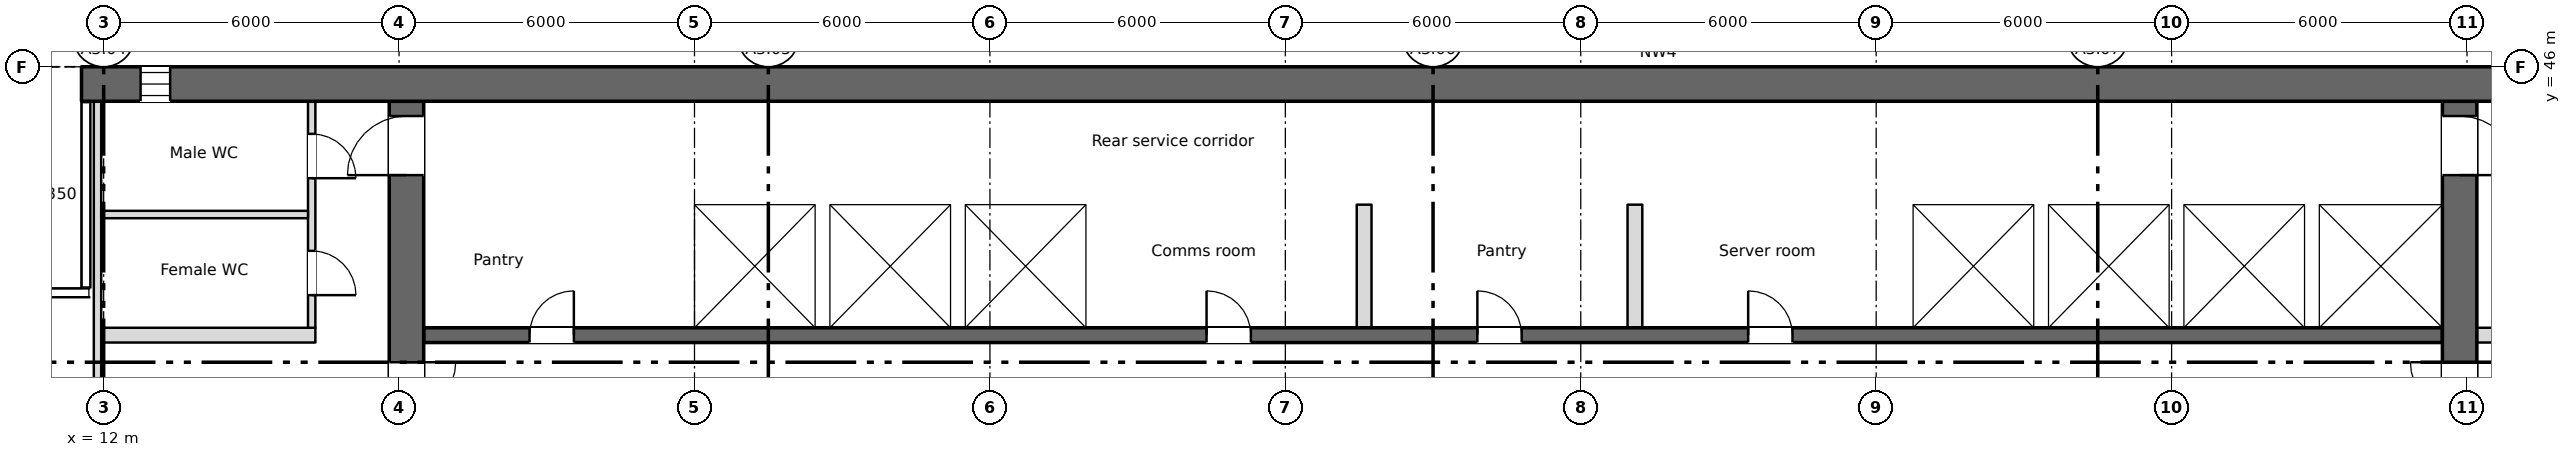
"""IFC4 building model, lengths in metres.
Left out: names, types, materials, properties, quantities, classifications, styles, units other than length and angle.
Written with IfcOpenShell. Run it as: python <this file> out.ifc"""

import sys

from ifc_helpers import new_model, si_unit, direction, frame, frame_2d, origin, place, context, subcontext, project, spatial, rectangle, extrude, element, fill, save


model = new_model("IFC4")
c1 = context("Model", 3, precision=1e-05, world=origin(), true_north=direction((0.0, 1.0)))
c2 = subcontext(c1, "Body", "Model", "MODEL_VIEW")
j1 = project(units=[si_unit("LENGTHUNIT", "METRE"), si_unit("PLANEANGLEUNIT", "RADIAN")], contexts=[c1])
p1 = place(None, origin())
s1 = spatial("IfcSite", under=j1, at=p1, CompositionType="ELEMENT")
p2 = place(p1, origin())
s2 = spatial("IfcBuilding", under=s1, at=p2, CompositionType="ELEMENT")
p3 = place(p2, frame((0.0, 0.0, 193.0)))
s3 = spatial("IfcBuildingStorey", under=s2, at=p3, CompositionType="ELEMENT", Elevation=193.0)
p4 = place(p3, frame((11.55, 45.65, 0.0), z_axis=(0.0, 0.0, 1.0), x_axis=(1.0, 0.0, 0.0)))
e1 = element("IfcWall", 1, at=p4, inside=s3, PredefinedType="SHEAR", context=c2, shape_type="SweptSolid", body=[
    extrude(rectangle(XDim=54.9, YDim=0.7, at=frame_2d((27.45, 0.0))), origin(), (0.0, 0.0, 1.0), 3.35),
])
p5 = place(p4, frame((1.2, 0.0, 0.6)))
e2 = element("IfcOpeningElement", 2, at=p5, cuts=e1, PredefinedType="OPENING", context=c2, shape_type="SweptSolid", body=[
    extrude(rectangle(XDim=0.6, YDim=2.4, at=frame_2d((0.3, 1.2))), frame((0.0, 0.36, 0.0), z_axis=(0.0, -1.0, 0.0), x_axis=(1.0, 0.0, 0.0)), (0.0, 0.0, 1.0), 0.72),
])
p6 = place(p3, frame((18.15, 28.4, 0.0), z_axis=(0.0, 0.0, 1.0), x_axis=(0.0, 1.0, 0.0)))
e3 = element("IfcWall", 3, at=p6, inside=s3, PredefinedType="SHEAR", context=c2, shape_type="SweptSolid", body=[
    extrude(rectangle(XDim=16.9, YDim=0.7, at=frame_2d((8.45, 0.0))), origin(), (0.0, 0.0, 1.0), 3.35),
])
p7 = place(p6, frame((9.6, 0.0, 0.0)))
e4 = element("IfcOpeningElement", 4, at=p7, cuts=e3, PredefinedType="OPENING", context=c2, shape_type="SweptSolid", body=[
    extrude(rectangle(XDim=2.0, YDim=2.1, at=frame_2d((1.0, 1.05))), frame((0.0, 0.36, 0.0), z_axis=(0.0, -1.0, 0.0), x_axis=(1.0, 0.0, 0.0)), (0.0, 0.0, 1.0), 0.72),
])
p8 = place(p6, frame((15.4, 0.0, 0.0)))
e5 = element("IfcOpeningElement", 5, at=p8, cuts=e3, PredefinedType="OPENING", context=c2, shape_type="SweptSolid", body=[
    extrude(rectangle(XDim=1.2, YDim=2.1, at=frame_2d((0.6, 1.05))), frame((0.0, 0.36, 0.0), z_axis=(0.0, -1.0, 0.0), x_axis=(1.0, 0.0, 0.0)), (0.0, 0.0, 1.0), 0.72),
])
p9 = place(p3, frame((59.85, 28.4, 0.0), z_axis=(0.0, 0.0, 1.0), x_axis=(0.0, 1.0, 0.0)))
e6 = element("IfcWall", 6, at=p9, inside=s3, PredefinedType="SHEAR", context=c2, shape_type="SweptSolid", body=[
    extrude(rectangle(XDim=16.9, YDim=0.7, at=frame_2d((8.45, 0.0))), origin(), (0.0, 0.0, 1.0), 3.35),
])
p10 = place(p9, frame((9.6, 0.0, 0.0)))
e7 = element("IfcOpeningElement", 7, at=p10, cuts=e6, PredefinedType="OPENING", context=c2, shape_type="SweptSolid", body=[
    extrude(rectangle(XDim=2.0, YDim=2.1, at=frame_2d((1.0, 1.05))), frame((0.0, 0.36, 0.0), z_axis=(0.0, -1.0, 0.0), x_axis=(1.0, 0.0, 0.0)), (0.0, 0.0, 1.0), 0.72),
])
p11 = place(p9, frame((15.4, 0.0, 0.0)))
e8 = element("IfcOpeningElement", 8, at=p11, cuts=e6, PredefinedType="OPENING", context=c2, shape_type="SweptSolid", body=[
    extrude(rectangle(XDim=1.2, YDim=2.1, at=frame_2d((0.6, 1.05))), frame((0.0, 0.36, 0.0), z_axis=(0.0, -1.0, 0.0), x_axis=(1.0, 0.0, 0.0)), (0.0, 0.0, 1.0), 0.72),
])
p12 = place(p3, frame((18.5, 40.55, 0.0), z_axis=(0.0, 0.0, 1.0), x_axis=(1.0, 0.0, 0.0)))
e9 = element("IfcWall", 9, at=p12, inside=s3, PredefinedType="SHEAR", context=c2, shape_type="SweptSolid", body=[
    extrude(rectangle(XDim=41.0, YDim=0.3, at=frame_2d((20.5, 0.0))), origin(), (0.0, 0.0, 1.0), 3.35),
])
p13 = place(p12, frame((2.15, 0.0, 0.0)))
e10 = element("IfcOpeningElement", 10, at=p13, cuts=e9, PredefinedType="OPENING", context=c2, shape_type="SweptSolid", body=[
    extrude(rectangle(XDim=0.9, YDim=2.1, at=frame_2d((0.45, 1.05))), frame((0.0, 0.16, 0.0), z_axis=(0.0, -1.0, 0.0), x_axis=(1.0, 0.0, 0.0)), (0.0, 0.0, 1.0), 0.32),
])
p14 = place(p12, frame((15.9, 0.0, 0.0)))
e11 = element("IfcOpeningElement", 11, at=p14, cuts=e9, PredefinedType="OPENING", context=c2, shape_type="SweptSolid", body=[
    extrude(rectangle(XDim=0.9, YDim=2.1, at=frame_2d((0.45, 1.05))), frame((0.0, 0.16, 0.0), z_axis=(0.0, -1.0, 0.0), x_axis=(1.0, 0.0, 0.0)), (0.0, 0.0, 1.0), 0.32),
])
p15 = place(p12, frame((21.4, 0.0, 0.0)))
e12 = element("IfcOpeningElement", 12, at=p15, cuts=e9, PredefinedType="OPENING", context=c2, shape_type="SweptSolid", body=[
    extrude(rectangle(XDim=0.9, YDim=2.1, at=frame_2d((0.45, 1.05))), frame((0.0, 0.16, 0.0), z_axis=(0.0, -1.0, 0.0), x_axis=(1.0, 0.0, 0.0)), (0.0, 0.0, 1.0), 0.32),
])
p16 = place(p12, frame((26.9, 0.0, 0.0)))
e13 = element("IfcOpeningElement", 13, at=p16, cuts=e9, PredefinedType="OPENING", context=c2, shape_type="SweptSolid", body=[
    extrude(rectangle(XDim=0.9, YDim=2.1, at=frame_2d((0.45, 1.05))), frame((0.0, 0.16, 0.0), z_axis=(0.0, -1.0, 0.0), x_axis=(1.0, 0.0, 0.0)), (0.0, 0.0, 1.0), 0.32),
])
p17 = place(p12, frame((6.175, 0.0, 0.0)))
e14 = element("IfcOpeningElement", 14, at=p17, cuts=e9, PredefinedType="OPENING", context=c2, shape_type="SweptSolid", body=[
    extrude(rectangle(XDim=1.1, YDim=2.1, at=frame_2d((0.55, 1.05))), frame((0.0, 0.16, 0.0), z_axis=(0.0, -1.0, 0.0), x_axis=(1.0, 0.0, 0.0)), (0.0, 0.0, 1.0), 0.32),
])
p18 = place(p12, frame((8.925, 0.0, 0.0)))
e15 = element("IfcOpeningElement", 15, at=p18, cuts=e9, PredefinedType="OPENING", context=c2, shape_type="SweptSolid", body=[
    extrude(rectangle(XDim=1.1, YDim=2.1, at=frame_2d((0.55, 1.05))), frame((0.0, 0.16, 0.0), z_axis=(0.0, -1.0, 0.0), x_axis=(1.0, 0.0, 0.0)), (0.0, 0.0, 1.0), 0.32),
])
p19 = place(p12, frame((11.675, 0.0, 0.0)))
e16 = element("IfcOpeningElement", 16, at=p19, cuts=e9, PredefinedType="OPENING", context=c2, shape_type="SweptSolid", body=[
    extrude(rectangle(XDim=1.1, YDim=2.1, at=frame_2d((0.55, 1.05))), frame((0.0, 0.16, 0.0), z_axis=(0.0, -1.0, 0.0), x_axis=(1.0, 0.0, 0.0)), (0.0, 0.0, 1.0), 0.32),
])
p20 = place(p12, frame((30.925, 0.0, 0.0)))
e17 = element("IfcOpeningElement", 17, at=p20, cuts=e9, PredefinedType="OPENING", context=c2, shape_type="SweptSolid", body=[
    extrude(rectangle(XDim=1.1, YDim=2.1, at=frame_2d((0.55, 1.05))), frame((0.0, 0.16, 0.0), z_axis=(0.0, -1.0, 0.0), x_axis=(1.0, 0.0, 0.0)), (0.0, 0.0, 1.0), 0.32),
])
p21 = place(p12, frame((33.675, 0.0, 0.0)))
e18 = element("IfcOpeningElement", 18, at=p21, cuts=e9, PredefinedType="OPENING", context=c2, shape_type="SweptSolid", body=[
    extrude(rectangle(XDim=1.1, YDim=2.1, at=frame_2d((0.55, 1.05))), frame((0.0, 0.16, 0.0), z_axis=(0.0, -1.0, 0.0), x_axis=(1.0, 0.0, 0.0)), (0.0, 0.0, 1.0), 0.32),
])
p22 = place(p12, frame((36.375, 0.0, 0.0)))
e19 = element("IfcOpeningElement", 19, at=p22, cuts=e9, PredefinedType="OPENING", context=c2, shape_type="SweptSolid", body=[
    extrude(rectangle(XDim=1.2, YDim=2.1, at=frame_2d((0.6, 1.05))), frame((0.0, 0.16, 0.0), z_axis=(0.0, -1.0, 0.0), x_axis=(1.0, 0.0, 0.0)), (0.0, 0.0, 1.0), 0.32),
])
p23 = place(p12, frame((39.15, 0.0, 0.0)))
e20 = element("IfcOpeningElement", 20, at=p23, cuts=e9, PredefinedType="OPENING", context=c2, shape_type="SweptSolid", body=[
    extrude(rectangle(XDim=1.2, YDim=2.1, at=frame_2d((0.6, 1.05))), frame((0.0, 0.16, 0.0), z_axis=(0.0, -1.0, 0.0), x_axis=(1.0, 0.0, 0.0)), (0.0, 0.0, 1.0), 0.32),
])
p24 = place(p3, frame((18.5, 43.35, 0.0), z_axis=(0.0, 0.0, 1.0), x_axis=(1.0, 0.0, 0.0)))
e21 = element("IfcWall", 21, at=p24, inside=s3, PredefinedType="SHEAR", context=c2, shape_type="SweptSolid", body=[
    extrude(rectangle(XDim=41.0, YDim=0.3, at=frame_2d((20.5, 0.0))), origin(), (0.0, 0.0, 1.0), 3.35),
])
p25 = place(p3, frame((11.95, 40.55, 0.0), z_axis=(0.0, 0.0, 1.0), x_axis=(1.0, 0.0, 0.0)))
e22 = element("IfcWall", 22, at=p25, inside=s3, PredefinedType="PARTITIONING", context=c2, shape_type="SweptSolid", body=[
    extrude(rectangle(XDim=4.35, YDim=0.3, at=frame_2d((2.175, 0.0))), origin(), (0.0, 0.0, 1.0), 3.35),
])
p26 = place(p3, frame((60.2, 40.55, 0.0), z_axis=(0.0, 0.0, 1.0), x_axis=(1.0, 0.0, 0.0)))
e23 = element("IfcWall", 23, at=p26, inside=s3, PredefinedType="PARTITIONING", context=c2, shape_type="SweptSolid", body=[
    extrude(rectangle(XDim=2.5, YDim=0.3, at=frame_2d((1.25, 0.0))), origin(), (0.0, 0.0, 1.0), 3.35),
])
p27 = place(p26, frame((0.725, 0.0, 0.0)))
e24 = element("IfcOpeningElement", 24, at=p27, cuts=e23, PredefinedType="OPENING", context=c2, shape_type="SweptSolid", body=[
    extrude(rectangle(XDim=0.9, YDim=2.1, at=frame_2d((0.45, 1.05))), frame((0.0, 0.16, 0.0), z_axis=(0.0, -1.0, 0.0), x_axis=(1.0, 0.0, 0.0)), (0.0, 0.0, 1.0), 0.32),
])
for number, where, z_axis, x_axis in (
    (25, (23.85, 40.7, 0.0), (0.0, 0.0, 1.0), (0.0, 1.0, 0.0)),
    (26, (26.6, 40.7, 0.0), (0.0, 0.0, 1.0), (0.0, 1.0, 0.0)),
    (27, (29.35, 40.7, 0.0), (0.0, 0.0, 1.0), (0.0, 1.0, 0.0)),
    (28, (32.1, 40.7, 0.0), (0.0, 0.0, 1.0), (0.0, 1.0, 0.0)),
    (29, (48.6, 40.7, 0.0), (0.0, 0.0, 1.0), (0.0, 1.0, 0.0)),
    (30, (51.35, 40.7, 0.0), (0.0, 0.0, 1.0), (0.0, 1.0, 0.0)),
    (31, (54.1, 40.7, 0.0), (0.0, 0.0, 1.0), (0.0, 1.0, 0.0)),
    (32, (56.85, 40.7, 0.0), (0.0, 0.0, 1.0), (0.0, 1.0, 0.0)),
):
    element("IfcWall", number, at=place(p3, frame(where, z_axis=z_axis, x_axis=x_axis)), inside=s3, PredefinedType="SHEAR", context=c2, shape_type="SweptSolid", body=[
        extrude(rectangle(XDim=2.5, YDim=0.3, at=frame_2d((1.25, 0.0))), origin(), (0.0, 0.0, 1.0), 3.35),
    ])
p28 = place(p3, frame((16.225, 45.3, 0.0), z_axis=(0.0, 0.0, 1.0), x_axis=(0.0, -1.0, 0.0)))
e33 = element("IfcWall", 33, at=p28, inside=s3, PredefinedType="PARTITIONING", context=c2, shape_type="SweptSolid", body=[
    extrude(rectangle(XDim=4.6, YDim=0.15, at=frame_2d((2.3, 0.0))), origin(), (0.0, 0.0, 1.0), 3.35),
])
p29 = place(p28, frame((3.038, 0.0, 0.0)))
e34 = element("IfcOpeningElement", 34, at=p29, cuts=e33, PredefinedType="OPENING", context=c2, shape_type="SweptSolid", body=[
    extrude(rectangle(XDim=0.9, YDim=2.1, at=frame_2d((0.45, 1.05))), frame((0.0, 0.085, 0.0), z_axis=(0.0, -1.0, 0.0), x_axis=(1.0, 0.0, 0.0)), (0.0, 0.0, 1.0), 0.17),
])
p30 = place(p28, frame((0.663, 0.0, 0.0)))
e35 = element("IfcOpeningElement", 35, at=p30, cuts=e33, PredefinedType="OPENING", context=c2, shape_type="SweptSolid", body=[
    extrude(rectangle(XDim=0.9, YDim=2.1, at=frame_2d((0.45, 1.05))), frame((0.0, 0.085, 0.0), z_axis=(0.0, -1.0, 0.0), x_axis=(1.0, 0.0, 0.0)), (0.0, 0.0, 1.0), 0.17),
])
p31 = place(p3, frame((11.875, 39.45, 0.0), z_axis=(0.0, 0.0, 1.0), x_axis=(0.0, 1.0, 0.0)))
e36 = element("IfcWall", 36, at=p31, inside=s3, PredefinedType="PARTITIONING", context=c2, shape_type="SweptSolid", body=[
    extrude(rectangle(XDim=5.85, YDim=0.15, at=frame_2d((2.925, 0.0))), origin(), (0.0, 0.0, 1.0), 3.35),
])
p32 = place(p3, frame((11.95, 43.0, 0.0), z_axis=(0.0, 0.0, 1.0), x_axis=(1.0, 0.0, 0.0)))
e37 = element("IfcWall", 37, at=p32, inside=s3, PredefinedType="PARTITIONING", context=c2, shape_type="SweptSolid", body=[
    extrude(rectangle(XDim=4.2, YDim=0.15, at=frame_2d((2.1, 0.0))), origin(), (0.0, 0.0, 1.0), 3.35),
])
for number, where, z_axis, x_axis in (
    (38, (37.6, 40.7, 0.0), (0.0, 0.0, 1.0), (0.0, 1.0, 0.0)),
    (39, (43.1, 40.7, 0.0), (0.0, 0.0, 1.0), (0.0, 1.0, 0.0)),
):
    element("IfcWall", number, at=place(p3, frame(where, z_axis=z_axis, x_axis=x_axis)), inside=s3, PredefinedType="PARTITIONING", context=c2, shape_type="SweptSolid", body=[
        extrude(rectangle(XDim=2.5, YDim=0.3, at=frame_2d((1.25, 0.0))), origin(), (0.0, 0.0, 1.0), 3.35),
    ])
p33 = place(p5, origin())
e40 = element("IfcWindow", 40, at=p33, inside=s3, PartitioningType="SINGLE_PANEL", PredefinedType="WINDOW", context=c2, shape_type="SweptSolid", body=[
    extrude(rectangle(XDim=0.6, YDim=2.4, at=frame_2d((0.3, 1.2))), frame((0.0, 0.03, 0.0), z_axis=(0.0, -1.0, 0.0), x_axis=(1.0, 0.0, 0.0)), (0.0, 0.0, 1.0), 0.06),
])
fill(e2, e40)
p34 = place(p29, origin())
e41 = element("IfcDoor", 41, at=p34, inside=s3, OperationType="SINGLE_SWING_RIGHT", PredefinedType="DOOR", context=c2, shape_type="SweptSolid", body=[
    extrude(rectangle(XDim=0.9, YDim=2.1, at=frame_2d((0.45, 1.05))), frame((0.0, 0.025, 0.0), z_axis=(0.0, -1.0, 0.0), x_axis=(1.0, 0.0, 0.0)), (0.0, 0.0, 1.0), 0.05),
])
fill(e34, e41)
p35 = place(p30, origin())
e42 = element("IfcDoor", 42, at=p35, inside=s3, OperationType="SINGLE_SWING_RIGHT", PredefinedType="DOOR", context=c2, shape_type="SweptSolid", body=[
    extrude(rectangle(XDim=0.9, YDim=2.1, at=frame_2d((0.45, 1.05))), frame((0.0, 0.025, 0.0), z_axis=(0.0, -1.0, 0.0), x_axis=(1.0, 0.0, 0.0)), (0.0, 0.0, 1.0), 0.05),
])
fill(e35, e42)
p36 = place(p13, origin())
e43 = element("IfcDoor", 43, at=p36, inside=s3, OperationType="SINGLE_SWING_RIGHT", PredefinedType="DOOR", context=c2, shape_type="SweptSolid", body=[
    extrude(rectangle(XDim=0.9, YDim=2.1, at=frame_2d((0.45, 1.05))), frame((0.0, 0.025, 0.0), z_axis=(0.0, -1.0, 0.0), x_axis=(1.0, 0.0, 0.0)), (0.0, 0.0, 1.0), 0.05),
])
fill(e10, e43)
p37 = place(p14, origin())
e44 = element("IfcDoor", 44, at=p37, inside=s3, OperationType="SINGLE_SWING_LEFT", PredefinedType="DOOR", context=c2, shape_type="SweptSolid", body=[
    extrude(rectangle(XDim=0.9, YDim=2.1, at=frame_2d((0.45, 1.05))), frame((0.0, 0.025, 0.0), z_axis=(0.0, -1.0, 0.0), x_axis=(1.0, 0.0, 0.0)), (0.0, 0.0, 1.0), 0.05),
])
fill(e11, e44)
p38 = place(p15, origin())
e45 = element("IfcDoor", 45, at=p38, inside=s3, OperationType="SINGLE_SWING_LEFT", PredefinedType="DOOR", context=c2, shape_type="SweptSolid", body=[
    extrude(rectangle(XDim=0.9, YDim=2.1, at=frame_2d((0.45, 1.05))), frame((0.0, 0.025, 0.0), z_axis=(0.0, -1.0, 0.0), x_axis=(1.0, 0.0, 0.0)), (0.0, 0.0, 1.0), 0.05),
])
fill(e12, e45)
p39 = place(p16, origin())
e46 = element("IfcDoor", 46, at=p39, inside=s3, OperationType="SINGLE_SWING_LEFT", PredefinedType="DOOR", context=c2, shape_type="SweptSolid", body=[
    extrude(rectangle(XDim=0.9, YDim=2.1, at=frame_2d((0.45, 1.05))), frame((0.0, 0.025, 0.0), z_axis=(0.0, -1.0, 0.0), x_axis=(1.0, 0.0, 0.0)), (0.0, 0.0, 1.0), 0.05),
])
fill(e13, e46)
p40 = place(p17, origin())
e47 = element("IfcDoor", 47, at=p40, inside=s3, OperationType="SLIDING_TO_LEFT", PredefinedType="DOOR", context=c2, shape_type="SweptSolid", body=[
    extrude(rectangle(XDim=1.1, YDim=2.1, at=frame_2d((0.55, 1.05))), frame((0.0, 0.025, 0.0), z_axis=(0.0, -1.0, 0.0), x_axis=(1.0, 0.0, 0.0)), (0.0, 0.0, 1.0), 0.05),
])
fill(e14, e47)
p41 = place(p18, origin())
e48 = element("IfcDoor", 48, at=p41, inside=s3, OperationType="SLIDING_TO_LEFT", PredefinedType="DOOR", context=c2, shape_type="SweptSolid", body=[
    extrude(rectangle(XDim=1.1, YDim=2.1, at=frame_2d((0.55, 1.05))), frame((0.0, 0.025, 0.0), z_axis=(0.0, -1.0, 0.0), x_axis=(1.0, 0.0, 0.0)), (0.0, 0.0, 1.0), 0.05),
])
fill(e15, e48)
p42 = place(p19, origin())
e49 = element("IfcDoor", 49, at=p42, inside=s3, OperationType="SLIDING_TO_LEFT", PredefinedType="DOOR", context=c2, shape_type="SweptSolid", body=[
    extrude(rectangle(XDim=1.1, YDim=2.1, at=frame_2d((0.55, 1.05))), frame((0.0, 0.025, 0.0), z_axis=(0.0, -1.0, 0.0), x_axis=(1.0, 0.0, 0.0)), (0.0, 0.0, 1.0), 0.05),
])
fill(e16, e49)
p43 = place(p20, origin())
e50 = element("IfcDoor", 50, at=p43, inside=s3, OperationType="SLIDING_TO_LEFT", PredefinedType="DOOR", context=c2, shape_type="SweptSolid", body=[
    extrude(rectangle(XDim=1.1, YDim=2.1, at=frame_2d((0.55, 1.05))), frame((0.0, 0.025, 0.0), z_axis=(0.0, -1.0, 0.0), x_axis=(1.0, 0.0, 0.0)), (0.0, 0.0, 1.0), 0.05),
])
fill(e17, e50)
p44 = place(p21, origin())
e51 = element("IfcDoor", 51, at=p44, inside=s3, OperationType="SLIDING_TO_LEFT", PredefinedType="DOOR", context=c2, shape_type="SweptSolid", body=[
    extrude(rectangle(XDim=1.1, YDim=2.1, at=frame_2d((0.55, 1.05))), frame((0.0, 0.025, 0.0), z_axis=(0.0, -1.0, 0.0), x_axis=(1.0, 0.0, 0.0)), (0.0, 0.0, 1.0), 0.05),
])
fill(e18, e51)
p45 = place(p22, origin())
e52 = element("IfcDoor", 52, at=p45, inside=s3, OperationType="SLIDING_TO_LEFT", PredefinedType="DOOR", context=c2, shape_type="SweptSolid", body=[
    extrude(rectangle(XDim=1.2, YDim=2.1, at=frame_2d((0.6, 1.05))), frame((0.0, 0.025, 0.0), z_axis=(0.0, -1.0, 0.0), x_axis=(1.0, 0.0, 0.0)), (0.0, 0.0, 1.0), 0.05),
])
fill(e19, e52)
p46 = place(p23, origin())
e53 = element("IfcDoor", 53, at=p46, inside=s3, OperationType="SLIDING_TO_LEFT", PredefinedType="DOOR", context=c2, shape_type="SweptSolid", body=[
    extrude(rectangle(XDim=1.2, YDim=2.1, at=frame_2d((0.6, 1.05))), frame((0.0, 0.025, 0.0), z_axis=(0.0, -1.0, 0.0), x_axis=(1.0, 0.0, 0.0)), (0.0, 0.0, 1.0), 0.05),
])
fill(e20, e53)
p47 = place(p7, origin())
e54 = element("IfcDoor", 54, at=p47, inside=s3, OperationType="DOUBLE_DOOR_SINGLE_SWING", PredefinedType="DOOR", context=c2, shape_type="SweptSolid", body=[
    extrude(rectangle(XDim=2.0, YDim=2.1, at=frame_2d((1.0, 1.05))), frame((0.0, 0.025, 0.0), z_axis=(0.0, -1.0, 0.0), x_axis=(1.0, 0.0, 0.0)), (0.0, 0.0, 1.0), 0.05),
])
fill(e4, e54)
p48 = place(p10, origin())
e55 = element("IfcDoor", 55, at=p48, inside=s3, OperationType="DOUBLE_DOOR_SINGLE_SWING", PredefinedType="DOOR", context=c2, shape_type="SweptSolid", body=[
    extrude(rectangle(XDim=2.0, YDim=2.1, at=frame_2d((1.0, 1.05))), frame((0.0, 0.025, 0.0), z_axis=(0.0, -1.0, 0.0), x_axis=(1.0, 0.0, 0.0)), (0.0, 0.0, 1.0), 0.05),
])
fill(e7, e55)
p49 = place(p8, origin())
e56 = element("IfcDoor", 56, at=p49, inside=s3, OperationType="SINGLE_SWING_LEFT", PredefinedType="DOOR", context=c2, shape_type="SweptSolid", body=[
    extrude(rectangle(XDim=1.2, YDim=2.1, at=frame_2d((0.6, 1.05))), frame((0.0, 0.025, 0.0), z_axis=(0.0, -1.0, 0.0), x_axis=(1.0, 0.0, 0.0)), (0.0, 0.0, 1.0), 0.05),
])
fill(e5, e56)
p50 = place(p11, origin())
e57 = element("IfcDoor", 57, at=p50, inside=s3, OperationType="SINGLE_SWING_LEFT", PredefinedType="DOOR", context=c2, shape_type="SweptSolid", body=[
    extrude(rectangle(XDim=1.2, YDim=2.1, at=frame_2d((0.6, 1.05))), frame((0.0, 0.025, 0.0), z_axis=(0.0, -1.0, 0.0), x_axis=(1.0, 0.0, 0.0)), (0.0, 0.0, 1.0), 0.05),
])
fill(e8, e57)
save(model, sys.argv[1])
